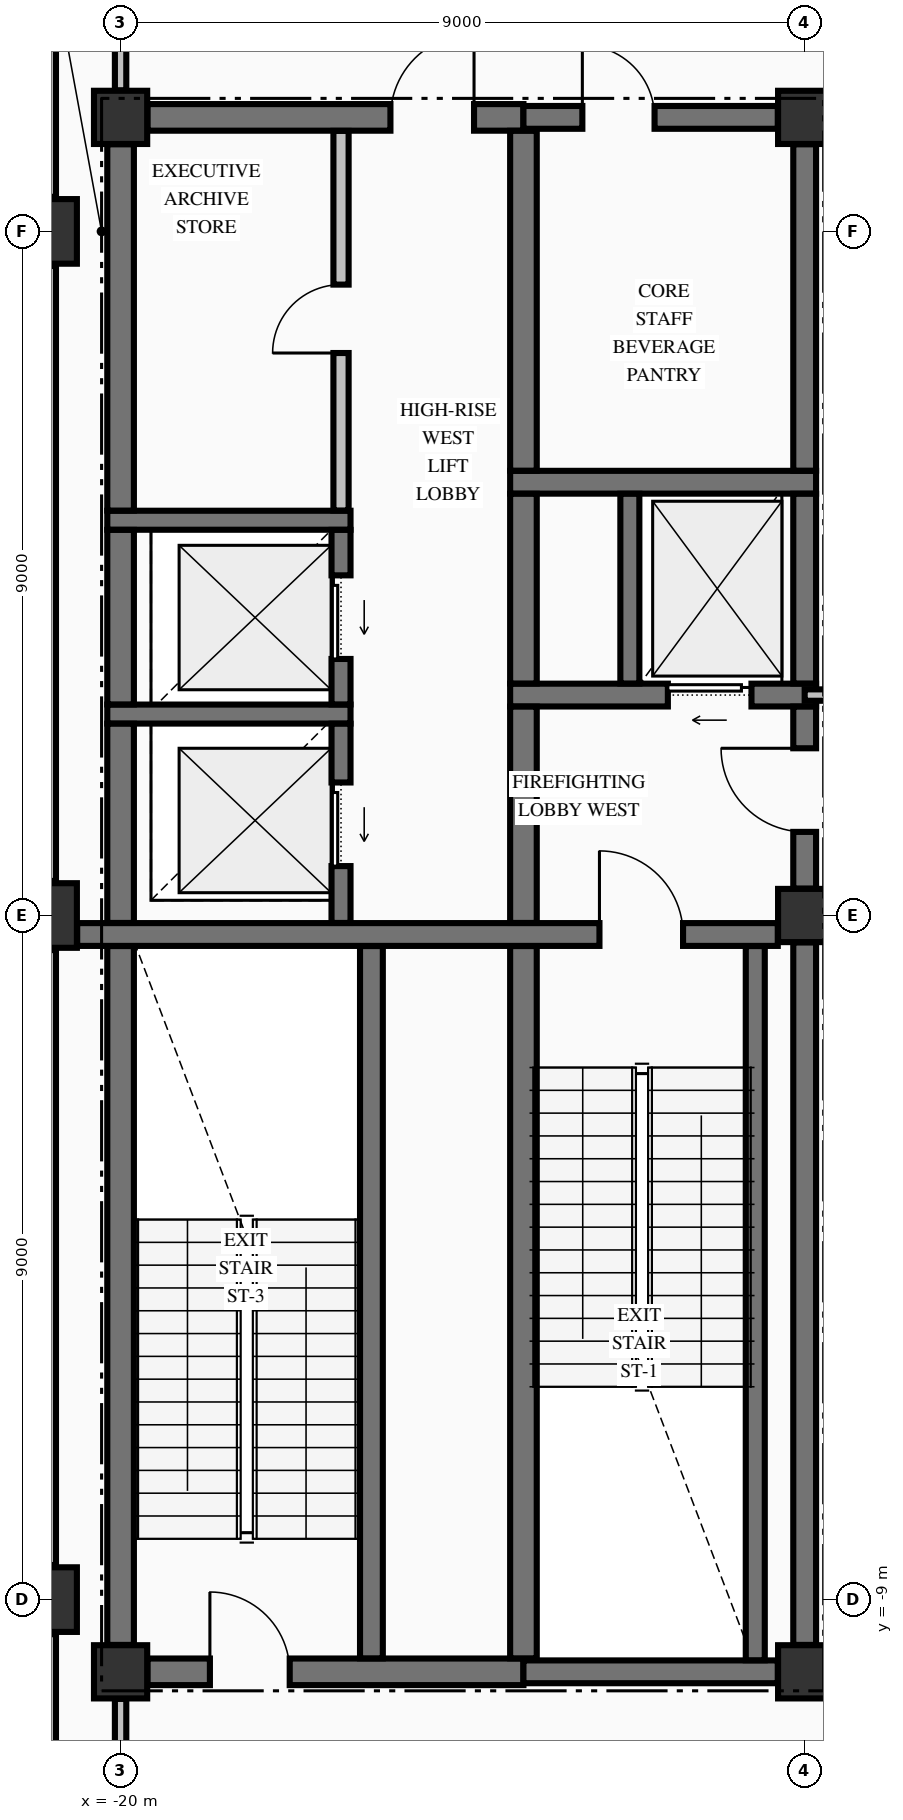
"""IFC4 building model, lengths in metres.
Left out: names, types, materials, properties, quantities, classifications, styles, units other than length and angle.
Written with IfcOpenShell. Run it as: python <this file> out.ifc"""

import sys

from ifc_helpers import new_model, si_unit, direction, frame, frame_2d, origin, origin_2d, place, context, subcontext, project, spatial, rectangle, extrude, element, fill, save


model = new_model("IFC4")
c1 = context("Model", 3, precision=1e-05, world=origin(), true_north=direction((0.0, 1.0)))
c2 = subcontext(c1, "Body", "Model", "MODEL_VIEW")
j1 = project(units=[si_unit("LENGTHUNIT", "METRE"), si_unit("PLANEANGLEUNIT", "RADIAN")], contexts=[c1])
p1 = place(None, origin())
s1 = spatial("IfcSite", under=j1, at=p1, CompositionType="ELEMENT")
p2 = place(p1, origin())
s2 = spatial("IfcBuilding", under=s1, at=p2, CompositionType="ELEMENT")
p3 = place(p2, frame((0.0, 0.0, 249.43)))
s3 = spatial("IfcBuildingStorey", under=s2, at=p3, CompositionType="ELEMENT", Elevation=249.43)
for number, where, z_axis, x_axis in (
    (1, (-21.0, -9.0, -0.425), (0.0, 0.0, 1.0), (1.0, 0.0, 0.0)),
    (2, (-21.0, 0.0, -0.425), (0.0, 0.0, 1.0), (1.0, 0.0, 0.0)),
    (3, (-21.0, 9.0, -0.425), (0.0, 0.0, 1.0), (1.0, 0.0, 0.0)),
):
    element("IfcColumn", number, at=place(p3, frame(where, z_axis=z_axis, x_axis=x_axis)), inside=s3, PredefinedType="COLUMN", context=c2, shape_type="SweptSolid", body=[
        extrude(rectangle(XDim=0.85, YDim=0.85, at=origin_2d()), origin(), (0.0, 0.0, 1.0), 5.0),
    ])
for number, where, z_axis, x_axis in (
    (4, (-20.0, -9.95, -0.425), (0.0, 0.0, 1.0), (1.0, 0.0, 0.0)),
    (5, (-20.0, 10.5, -0.425), (0.0, 0.0, 1.0), (1.0, 0.0, 0.0)),
    (6, (-11.0, -9.95, -0.425), (0.0, 0.0, 1.0), (1.0, 0.0, 0.0)),
    (7, (-11.0, 0.0, -0.425), (0.0, 0.0, 1.0), (1.0, 0.0, 0.0)),
    (8, (-11.0, 10.5, -0.425), (0.0, 0.0, 1.0), (1.0, 0.0, 0.0)),
):
    element("IfcColumn", number, at=place(p3, frame(where, z_axis=z_axis, x_axis=x_axis)), inside=s3, PredefinedType="COLUMN", context=c2, shape_type="SweptSolid", body=[
        extrude(rectangle(XDim=0.7, YDim=0.7, at=origin_2d()), origin(), (0.0, 0.0, 1.0), 5.0),
    ])
for number, where, z_axis, x_axis in (
    (9, (-21.0, -9.455, 0.0), (0.0, 0.0, 1.0), (0.0, -1.0, 0.0)),
    (10, (-21.0, -0.455, 0.0), (0.0, 0.0, 1.0), (0.0, -1.0, 0.0)),
    (11, (-21.0, 8.545, 0.0), (0.0, 0.0, 1.0), (0.0, -1.0, 0.0)),
    (12, (-21.0, 17.545, 0.0), (0.0, 0.0, 1.0), (0.0, -1.0, 0.0)),
):
    element("IfcWall", number, at=place(p3, frame(where, z_axis=z_axis, x_axis=x_axis)), inside=s3, PredefinedType="STANDARD", context=c2, shape_type="SweptSolid", body=[
        extrude(rectangle(XDim=8.09, YDim=0.3, at=frame_2d((4.045, 0.0))), origin(), (0.0, 0.0, 1.0), 2.167),
    ])
p4 = place(p3, frame((-19.646, -9.95, 0.0), z_axis=(0.0, 0.0, 1.0), x_axis=(1.0, 0.0, 0.0)))
e13 = element("IfcWall", 13, at=p4, inside=s3, PredefinedType="SHEAR", context=c2, shape_type="SweptSolid", body=[
    extrude(rectangle(XDim=4.946, YDim=0.35, at=frame_2d((2.473, 0.0))), origin(), (0.0, 0.0, 1.0), 4.575),
])
p5 = place(p4, frame((0.821, 0.0, 0.0)))
e14 = element("IfcOpeningElement", 14, at=p5, cuts=e13, PredefinedType="OPENING", context=c2, shape_type="SweptSolid", body=[
    extrude(rectangle(XDim=1.05, YDim=2.15, at=frame_2d((0.525, 1.075))), frame((0.0, 0.185, 0.0), z_axis=(0.0, -1.0, 0.0), x_axis=(1.0, 0.0, 0.0)), (0.0, 0.0, 1.0), 0.37),
])
p6 = place(p3, frame((-14.7, -9.95, 0.0), z_axis=(0.0, 0.0, 1.0), x_axis=(1.0, 0.0, 0.0)))
e15 = element("IfcWall", 15, at=p6, inside=s3, PredefinedType="SHEAR", context=c2, shape_type="SweptSolid", body=[
    extrude(rectangle(XDim=3.346, YDim=0.3, at=frame_2d((1.673, 0.0))), origin(), (0.0, 0.0, 1.0), 4.575),
])
p7 = place(p3, frame((-20.571, -0.25, 0.0), z_axis=(0.0, 0.0, 1.0), x_axis=(1.0, 0.0, 0.0)))
e16 = element("IfcWall", 16, at=p7, inside=s3, PredefinedType="SHEAR", context=c2, shape_type="SweptSolid", body=[
    extrude(rectangle(XDim=9.217, YDim=0.3, at=frame_2d((4.608, 0.0))), origin(), (0.0, 0.0, 1.0), 4.575),
])
p8 = place(p7, frame((6.871, 0.0, 0.0)))
e17 = element("IfcOpeningElement", 17, at=p8, cuts=e16, PredefinedType="OPENING", context=c2, shape_type="SweptSolid", body=[
    extrude(rectangle(XDim=1.1, YDim=2.15, at=frame_2d((0.55, 1.075))), frame((0.0, 0.16, 0.0), z_axis=(0.0, -1.0, 0.0), x_axis=(1.0, 0.0, 0.0)), (0.0, 0.0, 1.0), 0.32),
])
p9 = place(p3, frame((-20.175, 2.65, 0.0), z_axis=(0.0, 0.0, 1.0), x_axis=(1.0, 0.0, 0.0)))
e18 = element("IfcWall", 18, at=p9, inside=s3, PredefinedType="SOLIDWALL", context=c2, shape_type="SweptSolid", body=[
    extrude(rectangle(XDim=3.2, YDim=0.25, at=frame_2d((1.6, 0.0))), origin(), (0.0, 0.0, 1.0), 4.575),
])
p10 = place(p3, frame((-14.875, 2.9, 0.0), z_axis=(0.0, 0.0, 1.0), x_axis=(1.0, 0.0, 0.0)))
e19 = element("IfcWall", 19, at=p10, inside=s3, PredefinedType="SHEAR", context=c2, shape_type="SweptSolid", body=[
    extrude(rectangle(XDim=4.025, YDim=0.3, at=frame_2d((2.012, 0.0))), origin(), (0.0, 0.0, 1.0), 4.575),
])
p11 = place(p10, frame((2.075, 0.0, 0.0)))
e20 = element("IfcOpeningElement", 20, at=p11, cuts=e19, PredefinedType="OPENING", context=c2, shape_type="SweptSolid", body=[
    extrude(rectangle(XDim=1.1, YDim=2.2, at=frame_2d((0.55, 1.1))), frame((0.0, 0.16, 0.0), z_axis=(0.0, -1.0, 0.0), x_axis=(1.0, 0.0, 0.0)), (0.0, 0.0, 1.0), 0.32),
])
p12 = place(p3, frame((-20.175, 5.2, 0.0), z_axis=(0.0, 0.0, 1.0), x_axis=(1.0, 0.0, 0.0)))
e21 = element("IfcWall", 21, at=p12, inside=s3, PredefinedType="SOLIDWALL", context=c2, shape_type="SweptSolid", body=[
    extrude(rectangle(XDim=3.2, YDim=0.25, at=frame_2d((1.6, 0.0))), origin(), (0.0, 0.0, 1.0), 4.575),
])
p13 = place(p3, frame((-14.875, 5.7, 0.0), z_axis=(0.0, 0.0, 1.0), x_axis=(1.0, 0.0, 0.0)))
e22 = element("IfcWall", 22, at=p13, inside=s3, PredefinedType="SHEAR", context=c2, shape_type="SweptSolid", body=[
    extrude(rectangle(XDim=4.025, YDim=0.3, at=frame_2d((2.012, 0.0))), origin(), (0.0, 0.0, 1.0), 4.575),
])
p14 = place(p3, frame((-19.646, 10.5, 0.0), z_axis=(0.0, 0.0, 1.0), x_axis=(1.0, 0.0, 0.0)))
e23 = element("IfcWall", 23, at=p14, inside=s3, PredefinedType="SHEAR", context=c2, shape_type="SweptSolid", body=[
    extrude(rectangle(XDim=4.946, YDim=0.35, at=frame_2d((2.473, 0.0))), origin(), (0.0, 0.0, 1.0), 4.575),
])
p15 = place(p14, frame((3.196, 0.0, 0.0)))
e24 = element("IfcOpeningElement", 24, at=p15, cuts=e23, PredefinedType="OPENING", context=c2, shape_type="SweptSolid", body=[
    extrude(rectangle(XDim=1.1, YDim=2.15, at=frame_2d((0.55, 1.075))), frame((0.0, 0.185, 0.0), z_axis=(0.0, -1.0, 0.0), x_axis=(1.0, 0.0, 0.0)), (0.0, 0.0, 1.0), 0.37),
])
p16 = place(p3, frame((-14.7, 10.5, 0.0), z_axis=(0.0, 0.0, 1.0), x_axis=(1.0, 0.0, 0.0)))
e25 = element("IfcWall", 25, at=p16, inside=s3, PredefinedType="SHEAR", context=c2, shape_type="SweptSolid", body=[
    extrude(rectangle(XDim=3.346, YDim=0.3, at=frame_2d((1.673, 0.0))), origin(), (0.0, 0.0, 1.0), 4.575),
])
p17 = place(p16, frame((0.775, 0.0, 0.0)))
e26 = element("IfcOpeningElement", 26, at=p17, cuts=e25, PredefinedType="OPENING", context=c2, shape_type="SweptSolid", body=[
    extrude(rectangle(XDim=0.95, YDim=2.15, at=frame_2d((0.475, 1.075))), frame((0.0, 0.16, 0.0), z_axis=(0.0, -1.0, 0.0), x_axis=(1.0, 0.0, 0.0)), (0.0, 0.0, 1.0), 0.32),
])
p18 = place(p3, frame((-11.0, 2.9, 0.0), z_axis=(0.0, 0.0, 1.0), x_axis=(1.0, 0.0, 0.0)))
e27 = element("IfcWall", 27, at=p18, inside=s3, PredefinedType="PARTITIONING", context=c2, shape_type="SweptSolid", body=[
    extrude(rectangle(XDim=22.0, YDim=0.15, at=frame_2d((11.0, 0.0))), origin(), (0.0, 0.0, 1.0), 4.575),
])
p19 = place(p18, frame((13.9, 0.0, 0.0)))
e28 = element("IfcOpeningElement", 28, at=p19, cuts=e27, PredefinedType="OPENING", context=c2, shape_type="SweptSolid", body=[
    extrude(rectangle(XDim=1.1, YDim=2.15, at=frame_2d((0.55, 1.075))), frame((0.0, 0.085, 0.0), z_axis=(0.0, -1.0, 0.0), x_axis=(1.0, 0.0, 0.0)), (0.0, 0.0, 1.0), 0.17),
])
p20 = place(p18, frame((6.145, 0.0, 0.0)))
e29 = element("IfcOpeningElement", 29, at=p20, cuts=e27, PredefinedType="OPENING", context=c2, shape_type="SweptSolid", body=[
    extrude(rectangle(XDim=1.05, YDim=2.15, at=frame_2d((0.525, 1.075))), frame((0.0, 0.085, 0.0), z_axis=(0.0, -1.0, 0.0), x_axis=(1.0, 0.0, 0.0)), (0.0, 0.0, 1.0), 0.17),
])
p21 = place(p18, frame((18.23, 0.0, 0.0)))
e30 = element("IfcOpeningElement", 30, at=p21, cuts=e27, PredefinedType="OPENING", context=c2, shape_type="SweptSolid", body=[
    extrude(rectangle(XDim=1.1, YDim=2.15, at=frame_2d((0.55, 1.075))), frame((0.0, 0.085, 0.0), z_axis=(0.0, -1.0, 0.0), x_axis=(1.0, 0.0, 0.0)), (0.0, 0.0, 1.0), 0.17),
])
p22 = place(p3, frame((-20.0, -9.596, 0.0), z_axis=(0.0, 0.0, 1.0), x_axis=(0.0, 1.0, 0.0)))
e31 = element("IfcWall", 31, at=p22, inside=s3, PredefinedType="SHEAR", context=c2, shape_type="SweptSolid", body=[
    extrude(rectangle(XDim=9.194, YDim=0.35, at=frame_2d((4.597, 0.0))), origin(), (0.0, 0.0, 1.0), 4.575),
])
p23 = place(p3, frame((-20.0, -0.098, 0.0), z_axis=(0.0, 0.0, 1.0), x_axis=(0.0, 1.0, 0.0)))
e32 = element("IfcWall", 32, at=p23, inside=s3, PredefinedType="SHEAR", context=c2, shape_type="SweptSolid", body=[
    extrude(rectangle(XDim=2.621, YDim=0.35, at=frame_2d((1.311, 0.0))), origin(), (0.0, 0.0, 1.0), 4.575),
])
p24 = place(p3, frame((-20.0, 2.777, 0.0), z_axis=(0.0, 0.0, 1.0), x_axis=(0.0, 1.0, 0.0)))
e33 = element("IfcWall", 33, at=p24, inside=s3, PredefinedType="SHEAR", context=c2, shape_type="SweptSolid", body=[
    extrude(rectangle(XDim=2.296, YDim=0.35, at=frame_2d((1.148, 0.0))), origin(), (0.0, 0.0, 1.0), 4.575),
])
p25 = place(p3, frame((-20.0, 5.327, 0.0), z_axis=(0.0, 0.0, 1.0), x_axis=(0.0, 1.0, 0.0)))
e34 = element("IfcWall", 34, at=p25, inside=s3, PredefinedType="SHEAR", context=c2, shape_type="SweptSolid", body=[
    extrude(rectangle(XDim=4.819, YDim=0.35, at=frame_2d((2.41, 0.0))), origin(), (0.0, 0.0, 1.0), 4.575),
])
p26 = place(p3, frame((-17.1, -0.098, 0.0), z_axis=(0.0, 0.0, 1.0), x_axis=(0.0, 1.0, 0.0)))
e35 = element("IfcWall", 35, at=p26, inside=s3, PredefinedType="SOLIDWALL", context=c2, shape_type="SweptSolid", body=[
    extrude(rectangle(XDim=2.621, YDim=0.25, at=frame_2d((1.311, 0.0))), origin(), (0.0, 0.0, 1.0), 4.575),
])
p27 = place(p26, frame((0.748, 0.0, 0.0)))
e36 = element("IfcOpeningElement", 36, at=p27, cuts=e35, PredefinedType="OPENING", context=c2, shape_type="SweptSolid", body=[
    extrude(rectangle(XDim=1.1, YDim=2.2, at=frame_2d((0.55, 1.1))), frame((0.0, 0.135, 0.0), z_axis=(0.0, -1.0, 0.0), x_axis=(1.0, 0.0, 0.0)), (0.0, 0.0, 1.0), 0.27),
])
p28 = place(p3, frame((-17.1, 2.777, 0.0), z_axis=(0.0, 0.0, 1.0), x_axis=(0.0, 1.0, 0.0)))
e37 = element("IfcWall", 37, at=p28, inside=s3, PredefinedType="SOLIDWALL", context=c2, shape_type="SweptSolid", body=[
    extrude(rectangle(XDim=2.296, YDim=0.25, at=frame_2d((1.148, 0.0))), origin(), (0.0, 0.0, 1.0), 4.575),
])
p29 = place(p28, frame((0.598, 0.0, 0.0)))
e38 = element("IfcOpeningElement", 38, at=p29, cuts=e37, PredefinedType="OPENING", context=c2, shape_type="SweptSolid", body=[
    extrude(rectangle(XDim=1.1, YDim=2.2, at=frame_2d((0.55, 1.1))), frame((0.0, 0.135, 0.0), z_axis=(0.0, -1.0, 0.0), x_axis=(1.0, 0.0, 0.0)), (0.0, 0.0, 1.0), 0.27),
])
p30 = place(p3, frame((-16.7, -9.773, 0.0), z_axis=(0.0, 0.0, 1.0), x_axis=(0.0, 1.0, 0.0)))
e39 = element("IfcWall", 39, at=p30, inside=s3, PredefinedType="SHEAR", context=c2, shape_type="SweptSolid", body=[
    extrude(rectangle(XDim=9.371, YDim=0.3, at=frame_2d((4.686, 0.0))), origin(), (0.0, 0.0, 1.0), 4.575),
])
p31 = place(p3, frame((-14.7, -9.773, 0.0), z_axis=(0.0, 0.0, 1.0), x_axis=(0.0, 1.0, 0.0)))
e40 = element("IfcWall", 40, at=p31, inside=s3, PredefinedType="SHEAR", context=c2, shape_type="SweptSolid", body=[
    extrude(rectangle(XDim=9.371, YDim=0.35, at=frame_2d((4.686, 0.0))), origin(), (0.0, 0.0, 1.0), 4.575),
])
p32 = place(p3, frame((-14.7, -0.098, 0.0), z_axis=(0.0, 0.0, 1.0), x_axis=(0.0, 1.0, 0.0)))
e41 = element("IfcWall", 41, at=p32, inside=s3, PredefinedType="SHEAR", context=c2, shape_type="SweptSolid", body=[
    extrude(rectangle(XDim=2.846, YDim=0.35, at=frame_2d((1.423, 0.0))), origin(), (0.0, 0.0, 1.0), 4.575),
])
p33 = place(p3, frame((-14.7, 3.052, 0.0), z_axis=(0.0, 0.0, 1.0), x_axis=(0.0, 1.0, 0.0)))
e42 = element("IfcWall", 42, at=p33, inside=s3, PredefinedType="SHEAR", context=c2, shape_type="SweptSolid", body=[
    extrude(rectangle(XDim=2.496, YDim=0.35, at=frame_2d((1.248, 0.0))), origin(), (0.0, 0.0, 1.0), 4.575),
])
p34 = place(p3, frame((-14.7, 5.852, 0.0), z_axis=(0.0, 0.0, 1.0), x_axis=(0.0, 1.0, 0.0)))
e43 = element("IfcWall", 43, at=p34, inside=s3, PredefinedType="SHEAR", context=c2, shape_type="SweptSolid", body=[
    extrude(rectangle(XDim=4.471, YDim=0.35, at=frame_2d((2.235, 0.0))), origin(), (0.0, 0.0, 1.0), 4.575),
])
p35 = place(p3, frame((-13.3, 3.052, 0.0), z_axis=(0.0, 0.0, 1.0), x_axis=(0.0, 1.0, 0.0)))
e44 = element("IfcWall", 44, at=p35, inside=s3, PredefinedType="SOLIDWALL", context=c2, shape_type="SweptSolid", body=[
    extrude(rectangle(XDim=2.496, YDim=0.25, at=frame_2d((1.248, 0.0))), origin(), (0.0, 0.0, 1.0), 4.575),
])
p36 = place(p3, frame((-11.65, -9.798, 0.0), z_axis=(0.0, 0.0, 1.0), x_axis=(0.0, 1.0, 0.0)))
e45 = element("IfcWall", 45, at=p36, inside=s3, PredefinedType="SOLIDWALL", context=c2, shape_type="SweptSolid", body=[
    extrude(rectangle(XDim=9.396, YDim=0.25, at=frame_2d((4.698, 0.0))), origin(), (0.0, 0.0, 1.0), 4.575),
])
p37 = place(p3, frame((-11.0, -9.596, 0.0), z_axis=(0.0, 0.0, 1.0), x_axis=(0.0, 1.0, 0.0)))
e46 = element("IfcWall", 46, at=p37, inside=s3, PredefinedType="SHEAR", context=c2, shape_type="SweptSolid", body=[
    extrude(rectangle(XDim=9.242, YDim=0.3, at=frame_2d((4.621, 0.0))), origin(), (0.0, 0.0, 1.0), 4.575),
])
p38 = place(p3, frame((-11.0, 0.354, 0.0), z_axis=(0.0, 0.0, 1.0), x_axis=(0.0, 1.0, 0.0)))
e47 = element("IfcWall", 47, at=p38, inside=s3, PredefinedType="SHEAR", context=c2, shape_type="SweptSolid", body=[
    extrude(rectangle(XDim=2.394, YDim=0.3, at=frame_2d((1.197, 0.0))), origin(), (0.0, 0.0, 1.0), 4.575),
])
p39 = place(p38, frame((0.746, 0.0, 0.0)))
e48 = element("IfcOpeningElement", 48, at=p39, cuts=e47, PredefinedType="OPENING", context=c2, shape_type="SweptSolid", body=[
    extrude(rectangle(XDim=1.1, YDim=2.15, at=frame_2d((0.55, 1.075))), frame((0.0, 0.16, 0.0), z_axis=(0.0, -1.0, 0.0), x_axis=(1.0, 0.0, 0.0)), (0.0, 0.0, 1.0), 0.32),
])
p40 = place(p3, frame((-11.0, 3.052, 0.0), z_axis=(0.0, 0.0, 1.0), x_axis=(0.0, 1.0, 0.0)))
e49 = element("IfcWall", 49, at=p40, inside=s3, PredefinedType="SHEAR", context=c2, shape_type="SweptSolid", body=[
    extrude(rectangle(XDim=2.496, YDim=0.3, at=frame_2d((1.248, 0.0))), origin(), (0.0, 0.0, 1.0), 4.575),
])
p41 = place(p3, frame((-11.0, 5.852, 0.0), z_axis=(0.0, 0.0, 1.0), x_axis=(0.0, 1.0, 0.0)))
e50 = element("IfcWall", 50, at=p41, inside=s3, PredefinedType="SHEAR", context=c2, shape_type="SweptSolid", body=[
    extrude(rectangle(XDim=4.294, YDim=0.3, at=frame_2d((2.147, 0.0))), origin(), (0.0, 0.0, 1.0), 4.575),
])
p42 = place(p3, frame((-20.0, -12.122, 0.0), z_axis=(0.0, 0.0, 1.0), x_axis=(0.0, 1.0, 0.0)))
e51 = element("IfcWall", 51, at=p42, inside=s3, PredefinedType="PARTITIONING", context=c2, shape_type="SweptSolid", body=[
    extrude(rectangle(XDim=1.816, YDim=0.15, at=frame_2d((0.908, 0.0))), origin(), (0.0, 0.0, 1.0), 4.165),
])
p43 = place(p3, frame((-20.0, 10.856, 0.0), z_axis=(0.0, 0.0, 1.0), x_axis=(0.0, 1.0, 0.0)))
e52 = element("IfcWall", 52, at=p43, inside=s3, PredefinedType="PARTITIONING", context=c2, shape_type="SweptSolid", body=[
    extrude(rectangle(XDim=1.416, YDim=0.15, at=frame_2d((0.708, 0.0))), origin(), (0.0, 0.0, 1.0), 4.165),
])
p44 = place(p3, frame((-17.1, 5.328, 0.0), z_axis=(0.0, 0.0, 1.0), x_axis=(0.0, 1.0, 0.0)))
e53 = element("IfcWall", 53, at=p44, inside=s3, PredefinedType="PARTITIONING", context=c2, shape_type="SweptSolid", body=[
    extrude(rectangle(XDim=4.994, YDim=0.2, at=frame_2d((2.497, 0.0))), origin(), (0.0, 0.0, 1.0), 4.575),
])
p45 = place(p44, frame((2.072, 0.0, 0.0)))
e54 = element("IfcOpeningElement", 54, at=p45, cuts=e53, PredefinedType="OPENING", context=c2, shape_type="SweptSolid", body=[
    extrude(rectangle(XDim=0.9, YDim=2.15, at=frame_2d((0.45, 1.075))), frame((0.0, 0.11, 0.0), z_axis=(0.0, -1.0, 0.0), x_axis=(1.0, 0.0, 0.0)), (0.0, 0.0, 1.0), 0.22),
])
p46 = place(p8, origin())
e55 = element("IfcDoor", 55, at=p46, inside=s3, OperationType="SINGLE_SWING_LEFT", PredefinedType="DOOR", context=c2, shape_type="SweptSolid", body=[
    extrude(rectangle(XDim=1.1, YDim=2.15, at=frame_2d((0.55, 1.075))), frame((0.0, 0.025, 0.0), z_axis=(0.0, -1.0, 0.0), x_axis=(1.0, 0.0, 0.0)), (0.0, 0.0, 1.0), 0.05),
])
fill(e17, e55)
p47 = place(p39, origin())
e56 = element("IfcDoor", 56, at=p47, inside=s3, OperationType="SINGLE_SWING_RIGHT", PredefinedType="DOOR", context=c2, shape_type="SweptSolid", body=[
    extrude(rectangle(XDim=1.1, YDim=2.15, at=frame_2d((0.55, 1.075))), frame((0.0, 0.025, 0.0), z_axis=(0.0, -1.0, 0.0), x_axis=(1.0, 0.0, 0.0)), (0.0, 0.0, 1.0), 0.05),
])
fill(e48, e56)
p48 = place(p11, origin())
e57 = element("IfcDoor", 57, at=p48, inside=s3, OperationType="SLIDING_TO_LEFT", PredefinedType="DOOR", context=c2, shape_type="SweptSolid", body=[
    extrude(rectangle(XDim=1.1, YDim=2.2, at=frame_2d((0.55, 1.1))), frame((0.0, 0.025, 0.0), z_axis=(0.0, -1.0, 0.0), x_axis=(1.0, 0.0, 0.0)), (0.0, 0.0, 1.0), 0.05),
])
fill(e20, e57)
p49 = place(p17, origin())
e58 = element("IfcDoor", 58, at=p49, inside=s3, OperationType="SINGLE_SWING_LEFT", PredefinedType="DOOR", context=c2, shape_type="SweptSolid", body=[
    extrude(rectangle(XDim=0.95, YDim=2.15, at=frame_2d((0.475, 1.075))), frame((0.0, 0.025, 0.0), z_axis=(0.0, -1.0, 0.0), x_axis=(1.0, 0.0, 0.0)), (0.0, 0.0, 1.0), 0.05),
])
fill(e26, e58)
p50 = place(p5, origin())
e59 = element("IfcDoor", 59, at=p50, inside=s3, OperationType="SINGLE_SWING_LEFT", PredefinedType="DOOR", context=c2, shape_type="SweptSolid", body=[
    extrude(rectangle(XDim=1.05, YDim=2.15, at=frame_2d((0.525, 1.075))), frame((0.0, 0.025, 0.0), z_axis=(0.0, -1.0, 0.0), x_axis=(1.0, 0.0, 0.0)), (0.0, 0.0, 1.0), 0.05),
])
fill(e14, e59)
p51 = place(p27, origin())
e60 = element("IfcDoor", 60, at=p51, inside=s3, OperationType="SLIDING_TO_LEFT", PredefinedType="DOOR", context=c2, shape_type="SweptSolid", body=[
    extrude(rectangle(XDim=1.1, YDim=2.2, at=frame_2d((0.55, 1.1))), frame((0.0, 0.025, 0.0), z_axis=(0.0, -1.0, 0.0), x_axis=(1.0, 0.0, 0.0)), (0.0, 0.0, 1.0), 0.05),
])
fill(e36, e60)
p52 = place(p29, origin())
e61 = element("IfcDoor", 61, at=p52, inside=s3, OperationType="SLIDING_TO_LEFT", PredefinedType="DOOR", context=c2, shape_type="SweptSolid", body=[
    extrude(rectangle(XDim=1.1, YDim=2.2, at=frame_2d((0.55, 1.1))), frame((0.0, 0.025, 0.0), z_axis=(0.0, -1.0, 0.0), x_axis=(1.0, 0.0, 0.0)), (0.0, 0.0, 1.0), 0.05),
])
fill(e38, e61)
p53 = place(p15, origin())
e62 = element("IfcDoor", 62, at=p53, inside=s3, OperationType="SINGLE_SWING_RIGHT", PredefinedType="DOOR", context=c2, shape_type="SweptSolid", body=[
    extrude(rectangle(XDim=1.1, YDim=2.15, at=frame_2d((0.55, 1.075))), frame((0.0, 0.025, 0.0), z_axis=(0.0, -1.0, 0.0), x_axis=(1.0, 0.0, 0.0)), (0.0, 0.0, 1.0), 0.05),
])
fill(e24, e62)
p54 = place(p45, origin())
e63 = element("IfcDoor", 63, at=p54, inside=s3, OperationType="SINGLE_SWING_LEFT", PredefinedType="DOOR", context=c2, shape_type="SweptSolid", body=[
    extrude(rectangle(XDim=0.9, YDim=2.15, at=frame_2d((0.45, 1.075))), frame((0.0, 0.025, 0.0), z_axis=(0.0, -1.0, 0.0), x_axis=(1.0, 0.0, 0.0)), (0.0, 0.0, 1.0), 0.05),
])
fill(e54, e63)
save(model, sys.argv[1])
